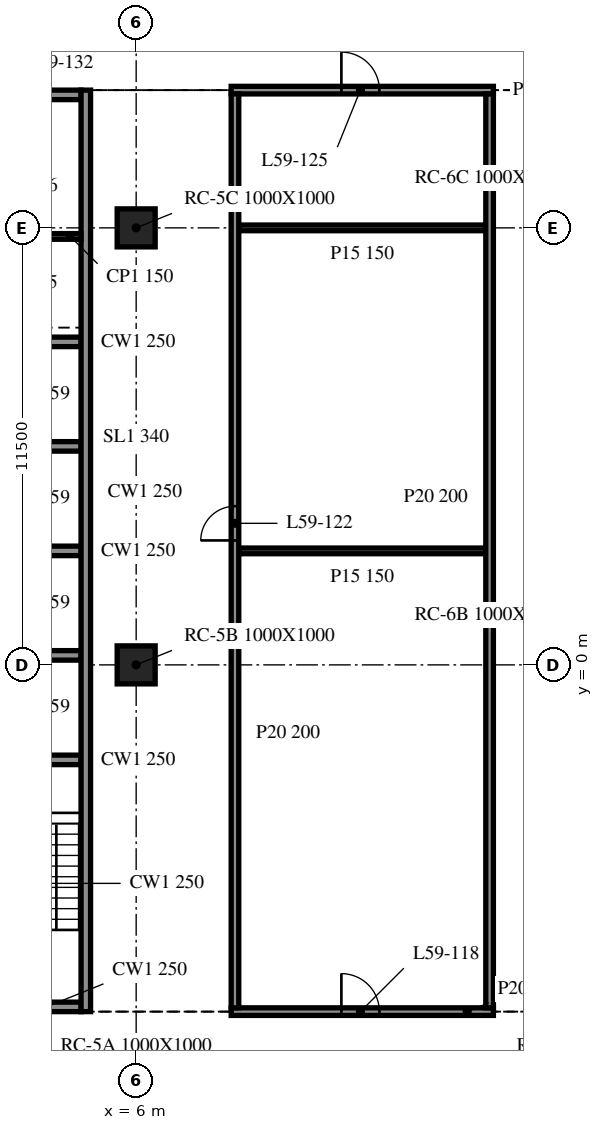
"""IFC4 building model, lengths in metres.
Left out: names, types, materials, properties, quantities, classifications, styles, units other than length and angle.
Written with IfcOpenShell. Run it as: python <this file> out.ifc"""

import sys

from ifc_helpers import new_model, si_unit, direction, frame, frame_2d, origin, origin_2d, place, context, subcontext, project, spatial, rectangle, extrude, element, fill, save


model = new_model("IFC4")
c1 = context("Model", 3, precision=1e-05, world=origin(), true_north=direction((0.0, 1.0)))
c2 = subcontext(c1, "Body", "Model", "MODEL_VIEW")
j1 = project(units=[si_unit("LENGTHUNIT", "METRE"), si_unit("PLANEANGLEUNIT", "RADIAN")], contexts=[c1])
p1 = place(None, origin())
s1 = spatial("IfcSite", under=j1, at=p1, CompositionType="ELEMENT")
p2 = place(p1, origin())
s2 = spatial("IfcBuilding", under=s1, at=p2, CompositionType="ELEMENT")
p3 = place(p2, frame((0.0, 0.0, 243.8)))
s3 = spatial("IfcBuildingStorey", under=s2, at=p3, CompositionType="ELEMENT", Elevation=243.8)
for number, where, z_axis, x_axis in (
    (1, (6.0, 0.0, -0.34), (0.0, 0.0, 1.0), (1.0, 0.0, 0.0)),
    (2, (6.0, 11.5, -0.34), (0.0, 0.0, 1.0), (1.0, 0.0, 0.0)),
):
    element("IfcColumn", number, at=place(p3, frame(where, z_axis=z_axis, x_axis=x_axis)), inside=s3, PredefinedType="COLUMN", context=c2, shape_type="SweptSolid", body=[
        extrude(rectangle(XDim=1.0, YDim=1.0, at=origin_2d()), origin(), (0.0, 0.0, 1.0), 3.8),
    ])
p4 = place(p3, frame((4.675, -9.125, 0.0), z_axis=(0.0, 0.0, 1.0), x_axis=(0.0, 1.0, 0.0)))
e3 = element("IfcWall", 3, at=p4, inside=s3, PredefinedType="SOLIDWALL", context=c2, shape_type="SweptSolid", body=[
    extrude(rectangle(XDim=24.25, YDim=0.25, at=frame_2d((12.125, 0.0))), origin(), (0.0, 0.0, 1.0), 3.46),
])
p5 = place(p3, frame((4.55, -9.0, 0.0), z_axis=(0.0, 0.0, 1.0), x_axis=(-1.0, 0.0, 0.0)))
e4 = element("IfcWall", 4, at=p5, inside=s3, PredefinedType="SOLIDWALL", context=c2, shape_type="SweptSolid", body=[
    extrude(rectangle(XDim=9.1, YDim=0.25, at=frame_2d((4.55, 0.0))), origin(), (0.0, 0.0, 1.0), 3.46),
])
p6 = place(p5, frame((3.65, 0.0, 0.0)))
e5 = element("IfcOpeningElement", 5, at=p6, cuts=e4, PredefinedType="OPENING", context=c2, shape_type="SweptSolid", body=[
    extrude(rectangle(XDim=1.8, YDim=2.1, at=frame_2d((0.9, 1.05))), frame((0.0, 0.135, 0.0), z_axis=(0.0, -1.0, 0.0), x_axis=(1.0, 0.0, 0.0)), (0.0, 0.0, 1.0), 0.27),
])
p7 = place(p3, frame((-4.55, 15.0, 0.0), z_axis=(0.0, 0.0, 1.0), x_axis=(1.0, 0.0, 0.0)))
e6 = element("IfcWall", 6, at=p7, inside=s3, PredefinedType="SOLIDWALL", context=c2, shape_type="SweptSolid", body=[
    extrude(rectangle(XDim=9.1, YDim=0.25, at=frame_2d((4.55, 0.0))), origin(), (0.0, 0.0, 1.0), 3.46),
])
p8 = place(p7, frame((3.65, 0.0, 0.0)))
e7 = element("IfcOpeningElement", 7, at=p8, cuts=e6, PredefinedType="OPENING", context=c2, shape_type="SweptSolid", body=[
    extrude(rectangle(XDim=1.8, YDim=2.1, at=frame_2d((0.9, 1.05))), frame((0.0, 0.135, 0.0), z_axis=(0.0, -1.0, 0.0), x_axis=(1.0, 0.0, 0.0)), (0.0, 0.0, 1.0), 0.27),
])
for number, where, z_axis, x_axis in (
    (8, (1.7, -2.5, 0.0), (0.0, 0.0, 1.0), (1.0, 0.0, 0.0)),
    (9, (1.7, 0.25, 0.0), (0.0, 0.0, 1.0), (1.0, 0.0, 0.0)),
    (10, (1.7, 3.0, 0.0), (0.0, 0.0, 1.0), (1.0, 0.0, 0.0)),
    (11, (1.7, 5.75, 0.0), (0.0, 0.0, 1.0), (1.0, 0.0, 0.0)),
    (12, (1.7, 8.5, 0.0), (0.0, 0.0, 1.0), (1.0, 0.0, 0.0)),
):
    element("IfcWall", number, at=place(p3, frame(where, z_axis=z_axis, x_axis=x_axis)), inside=s3, PredefinedType="SOLIDWALL", context=c2, shape_type="SweptSolid", body=[
        extrude(rectangle(XDim=2.85, YDim=0.25, at=frame_2d((1.425, 0.0))), origin(), (0.0, 0.0, 1.0), 3.46),
    ])
p9 = place(p3, frame((1.7, 11.275, 0.0), z_axis=(0.0, 0.0, 1.0), x_axis=(1.0, 0.0, 0.0)))
e13 = element("IfcWall", 13, at=p9, inside=s3, PredefinedType="PARTITIONING", context=c2, shape_type="SweptSolid", body=[
    extrude(rectangle(XDim=2.85, YDim=0.15, at=frame_2d((1.425, 0.0))), origin(), (0.0, 0.0, 1.0), 3.46),
])
p10 = place(p3, frame((8.5, -9.125, 0.0), z_axis=(0.0, 0.0, 1.0), x_axis=(1.0, 0.0, 0.0)))
e14 = element("IfcWall", 14, at=p10, inside=s3, PredefinedType="PARTITIONING", context=c2, shape_type="SweptSolid", body=[
    extrude(rectangle(XDim=6.9, YDim=0.2, at=frame_2d((3.45, 0.0))), origin(), (0.0, 0.0, 1.0), 3.46),
])
p11 = place(p10, frame((2.9, 0.0, 0.0)))
e15 = element("IfcOpeningElement", 15, at=p11, cuts=e14, PredefinedType="OPENING", context=c2, shape_type="SweptSolid", body=[
    extrude(rectangle(XDim=1.0, YDim=2.1, at=frame_2d((0.5, 1.05))), frame((0.0, 0.11, 0.0), z_axis=(0.0, -1.0, 0.0), x_axis=(1.0, 0.0, 0.0)), (0.0, 0.0, 1.0), 0.22),
])
for number, where, z_axis, x_axis in (
    (16, (8.7, 3.0, 0.0), (0.0, 0.0, 1.0), (1.0, 0.0, 0.0)),
    (17, (8.7, 11.5, 0.0), (0.0, 0.0, 1.0), (1.0, 0.0, 0.0)),
):
    element("IfcWall", number, at=place(p3, frame(where, z_axis=z_axis, x_axis=x_axis)), inside=s3, PredefinedType="PARTITIONING", context=c2, shape_type="SweptSolid", body=[
        extrude(rectangle(XDim=6.5, YDim=0.15, at=frame_2d((3.25, 0.0))), origin(), (0.0, 0.0, 1.0), 3.46),
    ])
p12 = place(p3, frame((8.5, 15.125, 0.0), z_axis=(0.0, 0.0, 1.0), x_axis=(1.0, 0.0, 0.0)))
e18 = element("IfcWall", 18, at=p12, inside=s3, PredefinedType="PARTITIONING", context=c2, shape_type="SweptSolid", body=[
    extrude(rectangle(XDim=6.9, YDim=0.2, at=frame_2d((3.45, 0.0))), origin(), (0.0, 0.0, 1.0), 3.46),
])
p13 = place(p12, frame((2.9, 0.0, 0.0)))
e19 = element("IfcOpeningElement", 19, at=p13, cuts=e18, PredefinedType="OPENING", context=c2, shape_type="SweptSolid", body=[
    extrude(rectangle(XDim=1.0, YDim=2.1, at=frame_2d((0.5, 1.05))), frame((0.0, 0.11, 0.0), z_axis=(0.0, -1.0, 0.0), x_axis=(1.0, 0.0, 0.0)), (0.0, 0.0, 1.0), 0.22),
])
p14 = place(p3, frame((8.6, -9.025, 0.0), z_axis=(0.0, 0.0, 1.0), x_axis=(0.0, 1.0, 0.0)))
e20 = element("IfcWall", 20, at=p14, inside=s3, PredefinedType="PARTITIONING", context=c2, shape_type="SweptSolid", body=[
    extrude(rectangle(XDim=24.05, YDim=0.2, at=frame_2d((12.025, 0.0))), origin(), (0.0, 0.0, 1.0), 3.46),
])
p15 = place(p14, frame((12.3, 0.0, 0.0)))
e21 = element("IfcOpeningElement", 21, at=p15, cuts=e20, PredefinedType="OPENING", context=c2, shape_type="SweptSolid", body=[
    extrude(rectangle(XDim=0.9, YDim=2.1, at=frame_2d((0.45, 1.05))), frame((0.0, 0.11, 0.0), z_axis=(0.0, -1.0, 0.0), x_axis=(1.0, 0.0, 0.0)), (0.0, 0.0, 1.0), 0.22),
])
p16 = place(p3, frame((15.3, -9.025, 0.0), z_axis=(0.0, 0.0, 1.0), x_axis=(0.0, 1.0, 0.0)))
e22 = element("IfcWall", 22, at=p16, inside=s3, PredefinedType="PARTITIONING", context=c2, shape_type="SweptSolid", body=[
    extrude(rectangle(XDim=24.05, YDim=0.2, at=frame_2d((12.025, 0.0))), origin(), (0.0, 0.0, 1.0), 3.46),
])
p17 = place(p11, origin())
e23 = element("IfcDoor", 23, at=p17, inside=s3, OperationType="SINGLE_SWING_LEFT", PredefinedType="DOOR", context=c2, shape_type="SweptSolid", body=[
    extrude(rectangle(XDim=1.0, YDim=2.1, at=frame_2d((0.5, 1.05))), frame((0.0, 0.025, 0.0), z_axis=(0.0, -1.0, 0.0), x_axis=(1.0, 0.0, 0.0)), (0.0, 0.0, 1.0), 0.05),
])
fill(e15, e23)
p18 = place(p15, origin())
e24 = element("IfcDoor", 24, at=p18, inside=s3, OperationType="SINGLE_SWING_LEFT", PredefinedType="DOOR", context=c2, shape_type="SweptSolid", body=[
    extrude(rectangle(XDim=0.9, YDim=2.1, at=frame_2d((0.45, 1.05))), frame((0.0, 0.025, 0.0), z_axis=(0.0, -1.0, 0.0), x_axis=(1.0, 0.0, 0.0)), (0.0, 0.0, 1.0), 0.05),
])
fill(e21, e24)
p19 = place(p13, origin())
e25 = element("IfcDoor", 25, at=p19, inside=s3, OperationType="SINGLE_SWING_RIGHT", PredefinedType="DOOR", context=c2, shape_type="SweptSolid", body=[
    extrude(rectangle(XDim=1.0, YDim=2.1, at=frame_2d((0.5, 1.05))), frame((0.0, 0.025, 0.0), z_axis=(0.0, -1.0, 0.0), x_axis=(1.0, 0.0, 0.0)), (0.0, 0.0, 1.0), 0.05),
])
fill(e19, e25)
save(model, sys.argv[1])
